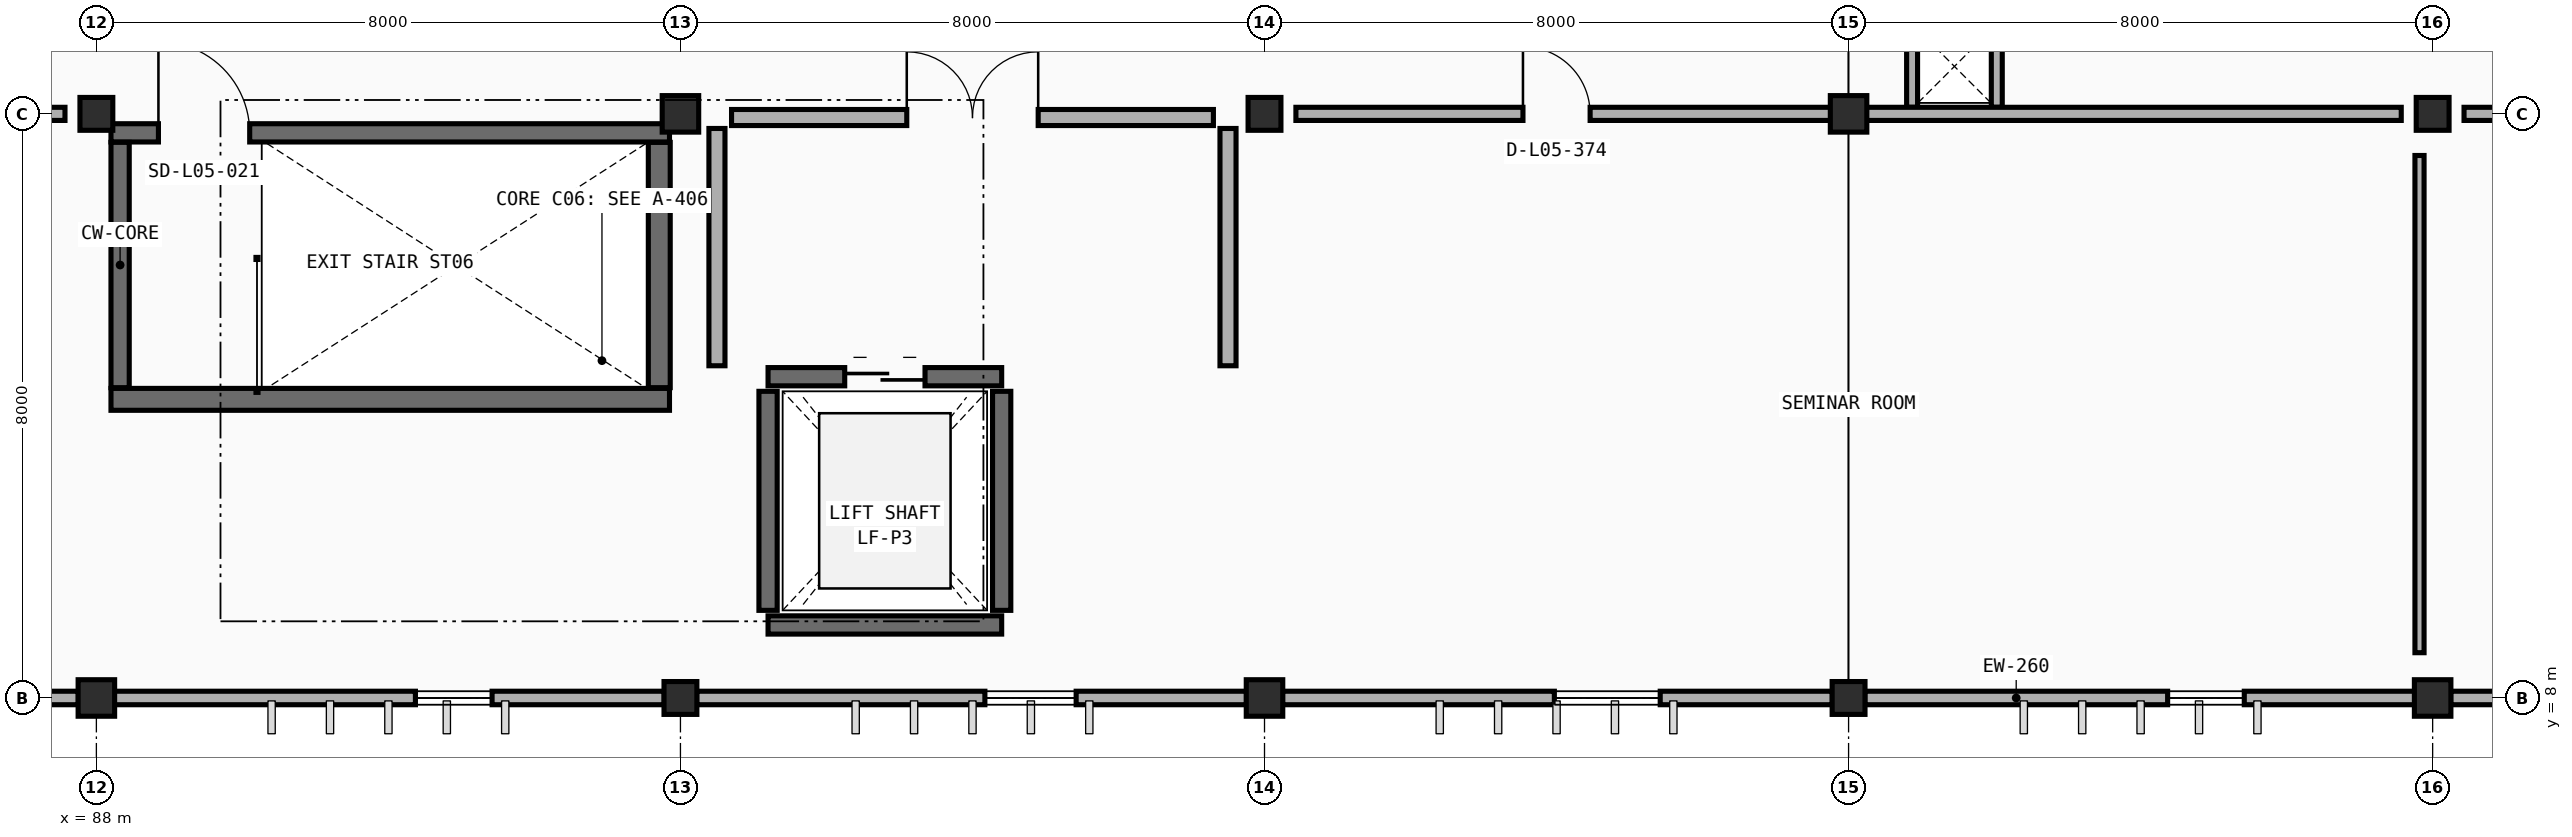
"""IFC4 building model, lengths in metres.
Left out: names, types, materials, properties, quantities, classifications, styles, units other than length and angle.
Written with IfcOpenShell. Run it as: python <this file> out.ifc"""

import sys

from ifc_helpers import new_model, si_unit, direction, frame, frame_2d, origin, origin_2d, place, context, subcontext, project, spatial, rectangle, extrude, element, fill, save


model = new_model("IFC4")
c1 = context("Model", 3, precision=1e-05, world=origin(), true_north=direction((0.0, 1.0)))
c2 = subcontext(c1, "Body", "Model", "MODEL_VIEW")
j1 = project(units=[si_unit("LENGTHUNIT", "METRE"), si_unit("PLANEANGLEUNIT", "RADIAN")], contexts=[c1])
p1 = place(None, origin())
s1 = spatial("IfcSite", under=j1, at=p1, CompositionType="ELEMENT")
p2 = place(p1, origin())
s2 = spatial("IfcBuilding", under=s1, at=p2, CompositionType="ELEMENT")
p3 = place(p2, frame((0.0, 0.0, 18.0)))
s3 = spatial("IfcBuildingStorey", under=s2, at=p3, CompositionType="ELEMENT", Elevation=18.0)
p4 = place(p3, frame((88.0, 8.0, 0.0), z_axis=(0.0, 0.0, 1.0), x_axis=(1.0, 0.0, 0.0)))
e1 = element("IfcColumn", 1, at=p4, inside=s3, PredefinedType="COLUMN", context=c2, shape_type="SweptSolid", body=[
    extrude(rectangle(XDim=0.5, YDim=0.5, at=origin_2d()), origin(), (0.0, 0.0, 1.0), 4.2),
])
p5 = place(p3, frame((96.0, 8.0, 0.0), z_axis=(0.0, 0.0, 1.0), x_axis=(1.0, 0.0, 0.0)))
e2 = element("IfcColumn", 2, at=p5, inside=s3, PredefinedType="COLUMN", context=c2, shape_type="SweptSolid", body=[
    extrude(rectangle(XDim=0.45, YDim=0.45, at=origin_2d()), origin(), (0.0, 0.0, 1.0), 4.2),
])
p6 = place(p3, frame((104.0, 8.0, 0.0), z_axis=(0.0, 0.0, 1.0), x_axis=(1.0, 0.0, 0.0)))
e3 = element("IfcColumn", 3, at=p6, inside=s3, PredefinedType="COLUMN", context=c2, shape_type="SweptSolid", body=[
    extrude(rectangle(XDim=0.5, YDim=0.5, at=origin_2d()), origin(), (0.0, 0.0, 1.0), 4.2),
])
p7 = place(p3, frame((112.0, 8.0, 0.0), z_axis=(0.0, 0.0, 1.0), x_axis=(1.0, 0.0, 0.0)))
e4 = element("IfcColumn", 4, at=p7, inside=s3, PredefinedType="COLUMN", context=c2, shape_type="SweptSolid", body=[
    extrude(rectangle(XDim=0.45, YDim=0.45, at=origin_2d()), origin(), (0.0, 0.0, 1.0), 4.2),
])
p8 = place(p3, frame((120.0, 8.0, 0.0), z_axis=(0.0, 0.0, 1.0), x_axis=(1.0, 0.0, 0.0)))
e5 = element("IfcColumn", 5, at=p8, inside=s3, PredefinedType="COLUMN", context=c2, shape_type="SweptSolid", body=[
    extrude(rectangle(XDim=0.5, YDim=0.5, at=origin_2d()), origin(), (0.0, 0.0, 1.0), 4.2),
])
p9 = place(p3, frame((88.0, 16.0, 0.0), z_axis=(0.0, 0.0, 1.0), x_axis=(1.0, 0.0, 0.0)))
e6 = element("IfcColumn", 6, at=p9, inside=s3, PredefinedType="COLUMN", context=c2, shape_type="SweptSolid", body=[
    extrude(rectangle(XDim=0.45, YDim=0.45, at=origin_2d()), origin(), (0.0, 0.0, 1.0), 4.2),
])
p10 = place(p3, frame((96.0, 16.0, 0.0), z_axis=(0.0, 0.0, 1.0), x_axis=(1.0, 0.0, 0.0)))
e7 = element("IfcColumn", 7, at=p10, inside=s3, PredefinedType="COLUMN", context=c2, shape_type="SweptSolid", body=[
    extrude(rectangle(XDim=0.5, YDim=0.5, at=origin_2d()), origin(), (0.0, 0.0, 1.0), 4.2),
])
p11 = place(p3, frame((104.0, 16.0, 0.0), z_axis=(0.0, 0.0, 1.0), x_axis=(1.0, 0.0, 0.0)))
e8 = element("IfcColumn", 8, at=p11, inside=s3, PredefinedType="COLUMN", context=c2, shape_type="SweptSolid", body=[
    extrude(rectangle(XDim=0.45, YDim=0.45, at=origin_2d()), origin(), (0.0, 0.0, 1.0), 4.2),
])
p12 = place(p3, frame((112.0, 16.0, 0.0), z_axis=(0.0, 0.0, 1.0), x_axis=(1.0, 0.0, 0.0)))
e9 = element("IfcColumn", 9, at=p12, inside=s3, PredefinedType="COLUMN", context=c2, shape_type="SweptSolid", body=[
    extrude(rectangle(XDim=0.5, YDim=0.5, at=origin_2d()), origin(), (0.0, 0.0, 1.0), 4.2),
])
p13 = place(p3, frame((120.0, 16.0, 0.0), z_axis=(0.0, 0.0, 1.0), x_axis=(1.0, 0.0, 0.0)))
e10 = element("IfcColumn", 10, at=p13, inside=s3, PredefinedType="COLUMN", context=c2, shape_type="SweptSolid", body=[
    extrude(rectangle(XDim=0.45, YDim=0.45, at=origin_2d()), origin(), (0.0, 0.0, 1.0), 4.2),
])
p14 = place(p3, frame((87.753, 8.0, 0.0), z_axis=(0.0, 0.0, 1.0), x_axis=(-1.0, 0.0, 0.0)))
e11 = element("IfcWall", 11, at=p14, inside=s3, PredefinedType="STANDARD", context=c2, shape_type="SweptSolid", body=[
    extrude(rectangle(XDim=7.531, YDim=0.185, at=frame_2d((3.766, 0.0))), origin(), (0.0, 0.0, 1.0), 3.335),
])
p15 = place(p14, frame((2.333, 0.0, 0.9)))
e12 = element("IfcOpeningElement", 12, at=p15, cuts=e11, PredefinedType="OPENING", context=c2, shape_type="SweptSolid", body=[
    extrude(rectangle(XDim=1.45, YDim=1.4, at=frame_2d((0.725, 0.7))), frame((0.0, 0.103, 0.0), z_axis=(0.0, -1.0, 0.0), x_axis=(1.0, 0.0, 0.0)), (0.0, 0.0, 1.0), 0.205),
])
p16 = place(p3, frame((95.778, 8.0, 0.0), z_axis=(0.0, 0.0, 1.0), x_axis=(-1.0, 0.0, 0.0)))
e13 = element("IfcWall", 13, at=p16, inside=s3, PredefinedType="STANDARD", context=c2, shape_type="SweptSolid", body=[
    extrude(rectangle(XDim=7.531, YDim=0.185, at=frame_2d((3.766, 0.0))), origin(), (0.0, 0.0, 1.0), 3.335),
])
p17 = place(p16, frame((2.358, 0.0, 0.9)))
e14 = element("IfcOpeningElement", 14, at=p17, cuts=e13, PredefinedType="OPENING", context=c2, shape_type="SweptSolid", body=[
    extrude(rectangle(XDim=1.05, YDim=1.4, at=frame_2d((0.525, 0.7))), frame((0.0, 0.103, 0.0), z_axis=(0.0, -1.0, 0.0), x_axis=(1.0, 0.0, 0.0)), (0.0, 0.0, 1.0), 0.205),
])
p18 = place(p3, frame((103.753, 8.0, 0.0), z_axis=(0.0, 0.0, 1.0), x_axis=(-1.0, 0.0, 0.0)))
e15 = element("IfcWall", 15, at=p18, inside=s3, PredefinedType="STANDARD", context=c2, shape_type="SweptSolid", body=[
    extrude(rectangle(XDim=7.531, YDim=0.185, at=frame_2d((3.766, 0.0))), origin(), (0.0, 0.0, 1.0), 3.335),
])
p19 = place(p18, frame((2.333, 0.0, 0.9)))
e16 = element("IfcOpeningElement", 16, at=p19, cuts=e15, PredefinedType="OPENING", context=c2, shape_type="SweptSolid", body=[
    extrude(rectangle(XDim=1.25, YDim=1.4, at=frame_2d((0.625, 0.7))), frame((0.0, 0.103, 0.0), z_axis=(0.0, -1.0, 0.0), x_axis=(1.0, 0.0, 0.0)), (0.0, 0.0, 1.0), 0.205),
])
p20 = place(p3, frame((111.778, 8.0, 0.0), z_axis=(0.0, 0.0, 1.0), x_axis=(-1.0, 0.0, 0.0)))
e17 = element("IfcWall", 17, at=p20, inside=s3, PredefinedType="STANDARD", context=c2, shape_type="SweptSolid", body=[
    extrude(rectangle(XDim=7.531, YDim=0.185, at=frame_2d((3.766, 0.0))), origin(), (0.0, 0.0, 1.0), 3.335),
])
p21 = place(p20, frame((2.358, 0.0, 0.9)))
e18 = element("IfcOpeningElement", 18, at=p21, cuts=e17, PredefinedType="OPENING", context=c2, shape_type="SweptSolid", body=[
    extrude(rectangle(XDim=1.45, YDim=1.4, at=frame_2d((0.725, 0.7))), frame((0.0, 0.103, 0.0), z_axis=(0.0, -1.0, 0.0), x_axis=(1.0, 0.0, 0.0)), (0.0, 0.0, 1.0), 0.205),
])
p22 = place(p3, frame((119.753, 8.0, 0.0), z_axis=(0.0, 0.0, 1.0), x_axis=(-1.0, 0.0, 0.0)))
e19 = element("IfcWall", 19, at=p22, inside=s3, PredefinedType="STANDARD", context=c2, shape_type="SweptSolid", body=[
    extrude(rectangle(XDim=7.531, YDim=0.185, at=frame_2d((3.766, 0.0))), origin(), (0.0, 0.0, 1.0), 3.335),
])
p23 = place(p22, frame((2.333, 0.0, 0.9)))
e20 = element("IfcOpeningElement", 20, at=p23, cuts=e19, PredefinedType="OPENING", context=c2, shape_type="SweptSolid", body=[
    extrude(rectangle(XDim=1.05, YDim=1.4, at=frame_2d((0.525, 0.7))), frame((0.0, 0.103, 0.0), z_axis=(0.0, -1.0, 0.0), x_axis=(1.0, 0.0, 0.0)), (0.0, 0.0, 1.0), 0.205),
])
p24 = place(p3, frame((127.778, 8.0, 0.0), z_axis=(0.0, 0.0, 1.0), x_axis=(-1.0, 0.0, 0.0)))
e21 = element("IfcWall", 21, at=p24, inside=s3, PredefinedType="STANDARD", context=c2, shape_type="SweptSolid", body=[
    extrude(rectangle(XDim=7.531, YDim=0.185, at=frame_2d((3.766, 0.0))), origin(), (0.0, 0.0, 1.0), 3.335),
])
p25 = place(p24, frame((2.358, 0.0, 0.9)))
e22 = element("IfcOpeningElement", 22, at=p25, cuts=e21, PredefinedType="OPENING", context=c2, shape_type="SweptSolid", body=[
    extrude(rectangle(XDim=1.25, YDim=1.4, at=frame_2d((0.625, 0.7))), frame((0.0, 0.103, 0.0), z_axis=(0.0, -1.0, 0.0), x_axis=(1.0, 0.0, 0.0)), (0.0, 0.0, 1.0), 0.205),
])
p26 = place(p3, frame((88.2, 12.09, 0.0), z_axis=(0.0, 0.0, 1.0), x_axis=(1.0, 0.0, 0.0)))
e23 = element("IfcWall", 23, at=p26, inside=s3, PredefinedType="SHEAR", context=c2, shape_type="SweptSolid", body=[
    extrude(rectangle(XDim=7.65, YDim=0.3, at=frame_2d((3.825, 0.0))), origin(), (0.0, 0.0, 1.0), 4.2),
])
p27 = place(p3, frame((95.71, 12.25, 0.0), z_axis=(0.0, 0.0, 1.0), x_axis=(0.0, 1.0, 0.0)))
e24 = element("IfcWall", 24, at=p27, inside=s3, PredefinedType="SHEAR", context=c2, shape_type="SweptSolid", body=[
    extrude(rectangle(XDim=3.36, YDim=0.3, at=frame_2d((1.68, 0.0))), origin(), (0.0, 0.0, 1.0), 4.2),
])
p28 = place(p3, frame((88.2, 15.74, 0.0), z_axis=(0.0, 0.0, 1.0), x_axis=(1.0, 0.0, 0.0)))
e25 = element("IfcWall", 25, at=p28, inside=s3, PredefinedType="SOLIDWALL", context=c2, shape_type="SweptSolid", body=[
    extrude(rectangle(XDim=7.65, YDim=0.25, at=frame_2d((3.825, 0.0))), origin(), (0.0, 0.0, 1.0), 4.2),
])
p29 = place(p28, frame((0.65, 0.0, 0.0)))
e26 = element("IfcOpeningElement", 26, at=p29, cuts=e25, PredefinedType="OPENING", context=c2, shape_type="SweptSolid", body=[
    extrude(rectangle(XDim=1.25, YDim=2.15, at=frame_2d((0.625, 1.075))), frame((0.0, 0.135, 0.0), z_axis=(0.0, -1.0, 0.0), x_axis=(1.0, 0.0, 0.0)), (0.0, 0.0, 1.0), 0.27),
])
p30 = place(p3, frame((88.325, 12.25, 0.0), z_axis=(0.0, 0.0, 1.0), x_axis=(0.0, 1.0, 0.0)))
e27 = element("IfcWall", 27, at=p30, inside=s3, PredefinedType="SOLIDWALL", context=c2, shape_type="SweptSolid", body=[
    extrude(rectangle(XDim=3.36, YDim=0.25, at=frame_2d((1.68, 0.0))), origin(), (0.0, 0.0, 1.0), 4.2),
])
p31 = place(p3, frame((97.2, 9.0, 0.0), z_axis=(0.0, 0.0, 1.0), x_axis=(1.0, 0.0, 0.0)))
e28 = element("IfcWall", 28, at=p31, inside=s3, PredefinedType="SOLIDWALL", context=c2, shape_type="SweptSolid", body=[
    extrude(rectangle(XDim=3.2, YDim=0.25, at=frame_2d((1.6, 0.0))), origin(), (0.0, 0.0, 1.0), 4.2),
])
p32 = place(p3, frame((97.2, 12.4, 0.0), z_axis=(0.0, 0.0, 1.0), x_axis=(1.0, 0.0, 0.0)))
e29 = element("IfcWall", 29, at=p32, inside=s3, PredefinedType="SOLIDWALL", context=c2, shape_type="SweptSolid", body=[
    extrude(rectangle(XDim=3.2, YDim=0.25, at=frame_2d((1.6, 0.0))), origin(), (0.0, 0.0, 1.0), 4.2),
])
p33 = place(p32, frame((1.05, 0.0, 0.0)))
e30 = element("IfcOpeningElement", 30, at=p33, cuts=e29, PredefinedType="OPENING", context=c2, shape_type="SweptSolid", body=[
    extrude(rectangle(XDim=1.1, YDim=2.15, at=frame_2d((0.55, 1.075))), frame((0.0, 0.135, 0.0), z_axis=(0.0, -1.0, 0.0), x_axis=(1.0, 0.0, 0.0)), (0.0, 0.0, 1.0), 0.27),
])
for number, where, z_axis, x_axis in (
    (31, (97.2, 9.2, 0.0), (0.0, 0.0, 1.0), (0.0, 1.0, 0.0)),
    (32, (100.4, 9.2, 0.0), (0.0, 0.0, 1.0), (0.0, 1.0, 0.0)),
):
    element("IfcWall", number, at=place(p3, frame(where, z_axis=z_axis, x_axis=x_axis)), inside=s3, PredefinedType="SOLIDWALL", context=c2, shape_type="SweptSolid", body=[
        extrude(rectangle(XDim=3.0, YDim=0.25, at=frame_2d((1.5, 0.0))), origin(), (0.0, 0.0, 1.0), 4.2),
    ])
p34 = place(p3, frame((96.7, 15.95, 0.0), z_axis=(0.0, 0.0, 1.0), x_axis=(1.0, 0.0, 0.0)))
e33 = element("IfcWall", 33, at=p34, inside=s3, PredefinedType="PARTITIONING", context=c2, shape_type="SweptSolid", body=[
    extrude(rectangle(XDim=6.6, YDim=0.22, at=frame_2d((3.3, 0.0))), origin(), (0.0, 0.0, 1.0), 3.3),
])
p35 = place(p34, frame((2.4, 0.0, 0.0)))
e34 = element("IfcOpeningElement", 34, at=p35, cuts=e33, PredefinedType="OPENING", context=c2, shape_type="SweptSolid", body=[
    extrude(rectangle(XDim=1.8, YDim=2.2, at=frame_2d((0.9, 1.1))), frame((0.0, 0.12, 0.0), z_axis=(0.0, -1.0, 0.0), x_axis=(1.0, 0.0, 0.0)), (0.0, 0.0, 1.0), 0.24),
])
for number, where, z_axis, x_axis in (
    (35, (96.5, 12.55, 0.0), (0.0, 0.0, 1.0), (0.0, 1.0, 0.0)),
    (36, (103.5, 12.55, 0.0), (0.0, 0.0, 1.0), (0.0, 1.0, 0.0)),
):
    element("IfcWall", number, at=place(p3, frame(where, z_axis=z_axis, x_axis=x_axis)), inside=s3, PredefinedType="PARTITIONING", context=c2, shape_type="SweptSolid", body=[
        extrude(rectangle(XDim=3.25, YDim=0.22, at=frame_2d((1.625, 0.0))), origin(), (0.0, 0.0, 1.0), 3.3),
    ])
for number, where, z_axis, x_axis in (
    (37, (114.03, 16.09, 0.0), (0.0, 0.0, 1.0), (0.0, 1.0, 0.0)),
    (38, (112.87, 17.23, 0.0), (0.0, 0.0, 1.0), (0.0, -1.0, 0.0)),
):
    element("IfcWall", number, at=place(p3, frame(where, z_axis=z_axis, x_axis=x_axis)), inside=s3, PredefinedType="PARTITIONING", context=c2, shape_type="SweptSolid", body=[
        extrude(rectangle(XDim=1.14, YDim=0.15, at=frame_2d((0.57, 0.0))), origin(), (0.0, 0.0, 1.0), 3.9),
    ])
p36 = place(p3, frame((64.43, 16.0, 0.0), z_axis=(0.0, 0.0, 1.0), x_axis=(1.0, 0.0, 0.0)))
e39 = element("IfcWall", 39, at=p36, inside=s3, PredefinedType="PARTITIONING", context=c2, shape_type="SweptSolid", body=[
    extrude(rectangle(XDim=23.14, YDim=0.18, at=frame_2d((11.57, 0.0))), origin(), (0.0, 0.0, 1.0), 3.3),
])
p37 = place(p36, frame((3.04, 0.0, 0.0)))
e40 = element("IfcOpeningElement", 40, at=p37, cuts=e39, PredefinedType="OPENING", context=c2, shape_type="SweptSolid", body=[
    extrude(rectangle(XDim=1.06, YDim=2.1, at=frame_2d((0.53, 1.05))), frame((0.0, 0.1, 0.0), z_axis=(0.0, -1.0, 0.0), x_axis=(1.0, 0.0, 0.0)), (0.0, 0.0, 1.0), 0.2),
])
p38 = place(p3, frame((104.43, 16.0, 0.0), z_axis=(0.0, 0.0, 1.0), x_axis=(1.0, 0.0, 0.0)))
e41 = element("IfcWall", 41, at=p38, inside=s3, PredefinedType="PARTITIONING", context=c2, shape_type="SweptSolid", body=[
    extrude(rectangle(XDim=15.14, YDim=0.18, at=frame_2d((7.57, 0.0))), origin(), (0.0, 0.0, 1.0), 3.3),
])
p39 = place(p38, frame((3.11, 0.0, 0.0)))
e42 = element("IfcOpeningElement", 42, at=p39, cuts=e41, PredefinedType="OPENING", context=c2, shape_type="SweptSolid", body=[
    extrude(rectangle(XDim=0.92, YDim=2.15, at=frame_2d((0.46, 1.075))), frame((0.0, 0.1, 0.0), z_axis=(0.0, -1.0, 0.0), x_axis=(1.0, 0.0, 0.0)), (0.0, 0.0, 1.0), 0.2),
])
p40 = place(p3, frame((119.82, 8.62, 0.0), z_axis=(0.0, 0.0, 1.0), x_axis=(0.0, 1.0, 0.0)))
e43 = element("IfcWall", 43, at=p40, inside=s3, PredefinedType="PARTITIONING", context=c2, shape_type="SweptSolid", body=[
    extrude(rectangle(XDim=6.81, YDim=0.125, at=frame_2d((3.405, 0.0))), origin(), (0.0, 0.0, 1.0), 3.3),
])
p41 = place(p3, frame((120.43, 16.0, 0.0), z_axis=(0.0, 0.0, 1.0), x_axis=(1.0, 0.0, 0.0)))
e44 = element("IfcWall", 44, at=p41, inside=s3, PredefinedType="PARTITIONING", context=c2, shape_type="SweptSolid", body=[
    extrude(rectangle(XDim=15.14, YDim=0.18, at=frame_2d((7.57, 0.0))), origin(), (0.0, 0.0, 1.0), 3.3),
])
p42 = place(p41, frame((3.095, 0.0, 0.0)))
e45 = element("IfcOpeningElement", 45, at=p42, cuts=e44, PredefinedType="OPENING", context=c2, shape_type="SweptSolid", body=[
    extrude(rectangle(XDim=0.95, YDim=2.1, at=frame_2d((0.475, 1.05))), frame((0.0, 0.1, 0.0), z_axis=(0.0, -1.0, 0.0), x_axis=(1.0, 0.0, 0.0)), (0.0, 0.0, 1.0), 0.2),
])
p43 = place(p17, origin())
e46 = element("IfcWindow", 46, at=p43, inside=s3, PartitioningType="SINGLE_PANEL", PredefinedType="WINDOW", context=c2, shape_type="SweptSolid", body=[
    extrude(rectangle(XDim=1.05, YDim=1.4, at=frame_2d((0.525, 0.7))), frame((0.0, 0.03, 0.0), z_axis=(0.0, -1.0, 0.0), x_axis=(1.0, 0.0, 0.0)), (0.0, 0.0, 1.0), 0.06),
])
fill(e14, e46)
p44 = place(p19, origin())
e47 = element("IfcWindow", 47, at=p44, inside=s3, PartitioningType="SINGLE_PANEL", PredefinedType="WINDOW", context=c2, shape_type="SweptSolid", body=[
    extrude(rectangle(XDim=1.25, YDim=1.4, at=frame_2d((0.625, 0.7))), frame((0.0, 0.03, 0.0), z_axis=(0.0, -1.0, 0.0), x_axis=(1.0, 0.0, 0.0)), (0.0, 0.0, 1.0), 0.06),
])
fill(e16, e47)
p45 = place(p21, origin())
e48 = element("IfcWindow", 48, at=p45, inside=s3, PartitioningType="SINGLE_PANEL", PredefinedType="WINDOW", context=c2, shape_type="SweptSolid", body=[
    extrude(rectangle(XDim=1.45, YDim=1.4, at=frame_2d((0.725, 0.7))), frame((0.0, 0.03, 0.0), z_axis=(0.0, -1.0, 0.0), x_axis=(1.0, 0.0, 0.0)), (0.0, 0.0, 1.0), 0.06),
])
fill(e18, e48)
p46 = place(p23, origin())
e49 = element("IfcWindow", 49, at=p46, inside=s3, PartitioningType="SINGLE_PANEL", PredefinedType="WINDOW", context=c2, shape_type="SweptSolid", body=[
    extrude(rectangle(XDim=1.05, YDim=1.4, at=frame_2d((0.525, 0.7))), frame((0.0, 0.03, 0.0), z_axis=(0.0, -1.0, 0.0), x_axis=(1.0, 0.0, 0.0)), (0.0, 0.0, 1.0), 0.06),
])
fill(e20, e49)
p47 = place(p29, origin())
e50 = element("IfcDoor", 50, at=p47, inside=s3, OperationType="SINGLE_SWING_LEFT", PredefinedType="DOOR", context=c2, shape_type="SweptSolid", body=[
    extrude(rectangle(XDim=1.25, YDim=2.15, at=frame_2d((0.625, 1.075))), frame((0.0, 0.025, 0.0), z_axis=(0.0, -1.0, 0.0), x_axis=(1.0, 0.0, 0.0)), (0.0, 0.0, 1.0), 0.05),
])
fill(e26, e50)
p48 = place(p33, origin())
e51 = element("IfcDoor", 51, at=p48, inside=s3, OperationType="DOUBLE_DOOR_SLIDING", PredefinedType="DOOR", context=c2, shape_type="SweptSolid", body=[
    extrude(rectangle(XDim=1.1, YDim=2.15, at=frame_2d((0.55, 1.075))), frame((0.0, 0.025, 0.0), z_axis=(0.0, -1.0, 0.0), x_axis=(1.0, 0.0, 0.0)), (0.0, 0.0, 1.0), 0.05),
])
fill(e30, e51)
p49 = place(p35, origin())
e52 = element("IfcDoor", 52, at=p49, inside=s3, OperationType="DOUBLE_DOOR_SINGLE_SWING", PredefinedType="DOOR", context=c2, shape_type="SweptSolid", body=[
    extrude(rectangle(XDim=1.8, YDim=2.2, at=frame_2d((0.9, 1.1))), frame((0.0, 0.025, 0.0), z_axis=(0.0, -1.0, 0.0), x_axis=(1.0, 0.0, 0.0)), (0.0, 0.0, 1.0), 0.05),
])
fill(e34, e52)
p50 = place(p39, origin())
e53 = element("IfcDoor", 53, at=p50, inside=s3, OperationType="SINGLE_SWING_LEFT", PredefinedType="DOOR", context=c2, shape_type="SweptSolid", body=[
    extrude(rectangle(XDim=0.92, YDim=2.15, at=frame_2d((0.46, 1.075))), frame((0.0, 0.025, 0.0), z_axis=(0.0, -1.0, 0.0), x_axis=(1.0, 0.0, 0.0)), (0.0, 0.0, 1.0), 0.05),
])
fill(e42, e53)
save(model, sys.argv[1])
